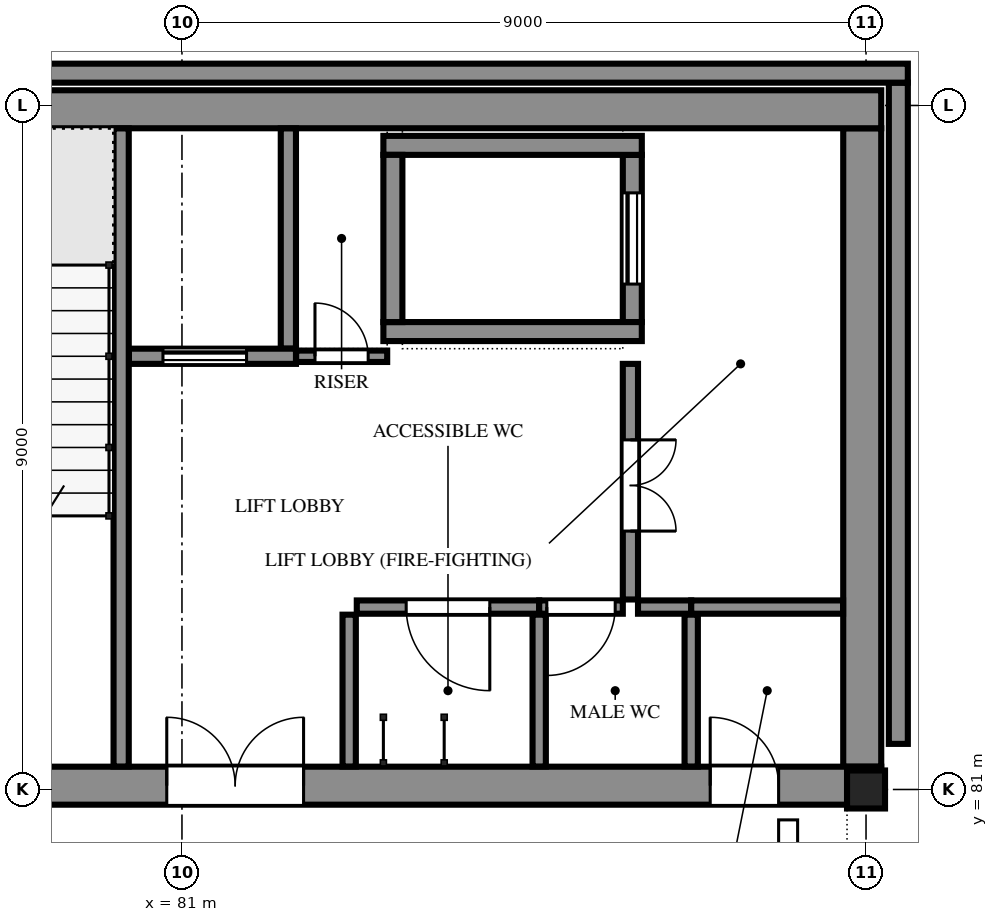
"""IFC4 building model, lengths in metres.
Left out: names, types, materials, properties, quantities, classifications, styles, units other than length and angle.
Written with IfcOpenShell. Run it as: python <this file> out.ifc"""

import sys

from ifc_helpers import new_model, si_unit, direction, frame, frame_2d, origin, origin_2d, place, context, subcontext, project, spatial, polyline, rectangle, hollow_rectangle, outline, extrude, element, fill, save


model = new_model("IFC4")
c1 = context("Model", 3, precision=1e-05, world=origin(), true_north=direction((0.0, 1.0)))
c2 = subcontext(c1, "Body", "Model", "MODEL_VIEW")
j1 = project(units=[si_unit("LENGTHUNIT", "METRE"), si_unit("PLANEANGLEUNIT", "RADIAN")], contexts=[c1])
p1 = place(None, origin())
s1 = spatial("IfcSite", under=j1, at=p1, CompositionType="ELEMENT")
p2 = place(p1, origin())
s2 = spatial("IfcBuilding", under=s1, at=p2, CompositionType="ELEMENT")
p3 = place(p2, frame((0.0, 0.0, 15.9)))
s3 = spatial("IfcBuildingStorey", under=s2, at=p3, CompositionType="ELEMENT", Elevation=15.9)
p4 = place(p3, frame((90.0, 81.0, 0.0), z_axis=(0.0, 0.0, 1.0), x_axis=(1.0, 0.0, 0.0)))
e1 = element("IfcColumn", 1, at=p4, inside=s3, PredefinedType="COLUMN", context=c2, shape_type="SweptSolid", body=[
    extrude(hollow_rectangle(XDim=0.5, YDim=0.5, WallThickness=0.032, at=origin_2d()), origin(), (0.0, 0.0, 1.0), 4.2),
])
p5 = place(p3, frame((71.8, 81.05, 0.0), z_axis=(0.0, 0.0, 1.0), x_axis=(1.0, 0.0, 0.0)))
e2 = element("IfcWall", 2, at=p5, inside=s3, PredefinedType="SOLIDWALL", context=c2, shape_type="SweptSolid", body=[
    extrude(rectangle(XDim=18.4, YDim=0.5, at=frame_2d((9.2, 0.0))), origin(), (0.0, 0.0, 1.0), 4.2),
])
p6 = place(p5, frame((1.5, 0.0, 0.0)))
e3 = element("IfcOpeningElement", 3, at=p6, cuts=e2, PredefinedType="OPENING", context=c2, shape_type="SweptSolid", body=[
    extrude(rectangle(XDim=1.8, YDim=2.1, at=frame_2d((0.9, 1.05))), frame((0.0, 0.26, 0.0), z_axis=(0.0, -1.0, 0.0), x_axis=(1.0, 0.0, 0.0)), (0.0, 0.0, 1.0), 0.52),
])
p7 = place(p5, frame((5.5, 0.0, 0.0)))
e4 = element("IfcOpeningElement", 4, at=p7, cuts=e2, PredefinedType="OPENING", context=c2, shape_type="SweptSolid", body=[
    extrude(rectangle(XDim=1.8, YDim=2.1, at=frame_2d((0.9, 1.05))), frame((0.0, 0.26, 0.0), z_axis=(0.0, -1.0, 0.0), x_axis=(1.0, 0.0, 0.0)), (0.0, 0.0, 1.0), 0.52),
])
p8 = place(p5, frame((9.0, 0.0, 0.0)))
e5 = element("IfcOpeningElement", 5, at=p8, cuts=e2, PredefinedType="OPENING", context=c2, shape_type="SweptSolid", body=[
    extrude(rectangle(XDim=1.8, YDim=2.1, at=frame_2d((0.9, 1.05))), frame((0.0, 0.26, 0.0), z_axis=(0.0, -1.0, 0.0), x_axis=(1.0, 0.0, 0.0)), (0.0, 0.0, 1.0), 0.52),
])
p9 = place(p5, frame((16.15, 0.0, 0.0)))
e6 = element("IfcOpeningElement", 6, at=p9, cuts=e2, PredefinedType="OPENING", context=c2, shape_type="SweptSolid", body=[
    extrude(rectangle(XDim=0.9, YDim=2.1, at=frame_2d((0.45, 1.05))), frame((0.0, 0.26, 0.0), z_axis=(0.0, -1.0, 0.0), x_axis=(1.0, 0.0, 0.0)), (0.0, 0.0, 1.0), 0.52),
])
p10 = place(p3, frame((71.8, 89.95, 0.0), z_axis=(0.0, 0.0, 1.0), x_axis=(1.0, 0.0, 0.0)))
e7 = element("IfcWall", 7, at=p10, inside=s3, PredefinedType="SOLIDWALL", context=c2, shape_type="SweptSolid", body=[
    extrude(rectangle(XDim=18.4, YDim=0.5, at=frame_2d((9.2, 0.0))), origin(), (0.0, 0.0, 1.0), 4.2),
])
p11 = place(p3, frame((89.95, 81.3, 0.0), z_axis=(0.0, 0.0, 1.0), x_axis=(0.0, 1.0, 0.0)))
e8 = element("IfcWall", 8, at=p11, inside=s3, PredefinedType="SOLIDWALL", context=c2, shape_type="SweptSolid", body=[
    extrude(rectangle(XDim=8.4, YDim=0.5, at=frame_2d((4.2, 0.0))), origin(), (0.0, 0.0, 1.0), 4.2),
])
p12 = place(p3, frame((80.2, 81.302, -0.15), z_axis=(0.0, 0.0, 1.0), x_axis=(0.0, 1.0, 0.0)))
e9 = element("IfcWall", 9, at=p12, inside=s3, PredefinedType="SOLIDWALL", context=c2, shape_type="SweptSolid", body=[
    extrude(rectangle(XDim=8.396, YDim=0.2, at=frame_2d((4.198, 0.0))), origin(), (0.0, 0.0, 1.0), 3.666),
])
p13 = place(p3, frame((80.302, 86.7, 0.0), z_axis=(0.0, 0.0, 1.0), x_axis=(1.0, 0.0, 0.0)))
e10 = element("IfcWall", 10, at=p13, inside=s3, PredefinedType="SOLIDWALL", context=c2, shape_type="SweptSolid", body=[
    extrude(rectangle(XDim=2.198, YDim=0.2, at=frame_2d((1.099, 0.0))), origin(), (0.0, 0.0, 1.0), 3.516),
])
p14 = place(p13, frame((0.448, 0.0, 0.0)))
e11 = element("IfcOpeningElement", 11, at=p14, cuts=e10, PredefinedType="OPENING", context=c2, shape_type="SweptSolid", body=[
    extrude(rectangle(XDim=1.1, YDim=2.1, at=frame_2d((0.55, 1.05))), frame((0.0, 0.11, 0.0), z_axis=(0.0, -1.0, 0.0), x_axis=(1.0, 0.0, 0.0)), (0.0, 0.0, 1.0), 0.22),
])
p15 = place(p3, frame((82.4, 86.8, 0.0), z_axis=(0.0, 0.0, 1.0), x_axis=(0.0, 1.0, 0.0)))
e12 = element("IfcWall", 12, at=p15, inside=s3, PredefinedType="SOLIDWALL", context=c2, shape_type="SweptSolid", body=[
    extrude(rectangle(XDim=2.898, YDim=0.2, at=frame_2d((1.449, 0.0))), origin(), (0.0, 0.0, 1.0), 3.516),
])
for number, where, z_axis, x_axis in (
    (13, (83.65, 87.025, 0.0), (0.0, 0.0, 1.0), (1.0, 0.0, 0.0)),
    (14, (83.65, 89.475, 0.0), (0.0, 0.0, 1.0), (1.0, 0.0, 0.0)),
):
    element("IfcWall", number, at=place(p3, frame(where, z_axis=z_axis, x_axis=x_axis)), inside=s3, PredefinedType="SOLIDWALL", context=c2, shape_type="SweptSolid", body=[
        extrude(rectangle(XDim=3.4, YDim=0.25, at=frame_2d((1.7, 0.0))), origin(), (0.0, 0.0, 1.0), 3.516),
    ])
p16 = place(p3, frame((83.775, 87.15, 0.0), z_axis=(0.0, 0.0, 1.0), x_axis=(0.0, 1.0, 0.0)))
e15 = element("IfcWall", 15, at=p16, inside=s3, PredefinedType="SOLIDWALL", context=c2, shape_type="SweptSolid", body=[
    extrude(rectangle(XDim=2.2, YDim=0.25, at=frame_2d((1.1, 0.0))), origin(), (0.0, 0.0, 1.0), 3.516),
])
p17 = place(p3, frame((86.925, 87.15, 0.0), z_axis=(0.0, 0.0, 1.0), x_axis=(0.0, 1.0, 0.0)))
e16 = element("IfcWall", 16, at=p17, inside=s3, PredefinedType="SOLIDWALL", context=c2, shape_type="SweptSolid", body=[
    extrude(rectangle(XDim=2.2, YDim=0.25, at=frame_2d((1.1, 0.0))), origin(), (0.0, 0.0, 1.0), 3.516),
])
p18 = place(p17, frame((0.5, 0.0, 0.0)))
e17 = element("IfcOpeningElement", 17, at=p18, cuts=e16, PredefinedType="OPENING", context=c2, shape_type="SweptSolid", body=[
    extrude(rectangle(XDim=1.2, YDim=2.1, at=frame_2d((0.6, 1.05))), frame((0.0, 0.135, 0.0), z_axis=(0.0, -1.0, 0.0), x_axis=(1.0, 0.0, 0.0)), (0.0, 0.0, 1.0), 0.27),
])
p19 = place(p3, frame((85.7, 83.4, 0.0), z_axis=(0.0, 0.0, 1.0), x_axis=(-1.0, 0.0, 0.0)))
e18 = element("IfcWall", 18, at=p19, inside=s3, PredefinedType="PARTITIONING", context=c2, shape_type="SweptSolid", body=[
    extrude(rectangle(XDim=2.4, YDim=0.175, at=frame_2d((1.2, 0.0))), origin(), (0.0, 0.0, 1.0), 3.307),
])
p20 = place(p19, frame((0.65, 0.0, 0.0)))
e19 = element("IfcOpeningElement", 19, at=p20, cuts=e18, PredefinedType="OPENING", context=c2, shape_type="SweptSolid", body=[
    extrude(rectangle(XDim=1.1, YDim=2.1, at=frame_2d((0.55, 1.05))), frame((0.0, 0.097, 0.0), z_axis=(0.0, -1.0, 0.0), x_axis=(1.0, 0.0, 0.0)), (0.0, 0.0, 1.0), 0.195),
])
p21 = place(p3, frame((83.2, 83.3, 0.0), z_axis=(0.0, 0.0, 1.0), x_axis=(0.0, -1.0, 0.0)))
e20 = element("IfcWall", 20, at=p21, inside=s3, PredefinedType="PARTITIONING", context=c2, shape_type="SweptSolid", body=[
    extrude(rectangle(XDim=1.998, YDim=0.175, at=frame_2d((0.999, 0.0))), origin(), (0.0, 0.0, 1.0), 3.307),
])
p22 = place(p3, frame((86.8, 83.4, 0.0), z_axis=(0.0, 0.0, 1.0), x_axis=(-1.0, 0.0, 0.0)))
e21 = element("IfcWall", 21, at=p22, inside=s3, PredefinedType="PARTITIONING", context=c2, shape_type="SweptSolid", body=[
    extrude(rectangle(XDim=1.1, YDim=0.175, at=frame_2d((0.55, 0.0))), origin(), (0.0, 0.0, 1.0), 3.307),
])
p23 = place(p22, frame((0.1, 0.0, 0.0)))
e22 = element("IfcOpeningElement", 22, at=p23, cuts=e21, PredefinedType="OPENING", context=c2, shape_type="SweptSolid", body=[
    extrude(rectangle(XDim=0.9, YDim=2.1, at=frame_2d((0.45, 1.05))), frame((0.0, 0.097, 0.0), z_axis=(0.0, -1.0, 0.0), x_axis=(1.0, 0.0, 0.0)), (0.0, 0.0, 1.0), 0.195),
])
p24 = place(p3, frame((86.9, 86.6, 0.0), z_axis=(0.0, 0.0, 1.0), x_axis=(0.0, -1.0, 0.0)))
e23 = element("IfcWall", 23, at=p24, inside=s3, PredefinedType="PARTITIONING", context=c2, shape_type="SweptSolid", body=[
    extrude(rectangle(XDim=3.1, YDim=0.2, at=frame_2d((1.55, 0.0))), origin(), (0.0, 0.0, 1.0), 3.382),
])
p25 = place(p24, frame((1.0, 0.0, 0.0)))
e24 = element("IfcOpeningElement", 24, at=p25, cuts=e23, PredefinedType="OPENING", context=c2, shape_type="SweptSolid", body=[
    extrude(rectangle(XDim=1.2, YDim=2.1, at=frame_2d((0.6, 1.05))), frame((0.0, 0.11, 0.0), z_axis=(0.0, -1.0, 0.0), x_axis=(1.0, 0.0, 0.0)), (0.0, 0.0, 1.0), 0.22),
])
p26 = place(p3, frame((82.502, 86.7, 0.0), z_axis=(0.0, 0.0, 1.0), x_axis=(1.0, 0.0, 0.0)))
e25 = element("IfcWall", 25, at=p26, inside=s3, PredefinedType="SOLIDWALL", context=c2, shape_type="SweptSolid", body=[
    extrude(rectangle(XDim=1.198, YDim=0.15, at=frame_2d((0.599, 0.0))), origin(), (0.0, 0.0, 1.0), 3.516),
])
p27 = place(p26, frame((0.248, 0.0, 0.0)))
e26 = element("IfcOpeningElement", 26, at=p27, cuts=e25, PredefinedType="OPENING", context=c2, shape_type="SweptSolid", body=[
    extrude(rectangle(XDim=0.7, YDim=2.0, at=frame_2d((0.35, 1.0))), frame((0.0, 0.085, 0.0), z_axis=(0.0, -1.0, 0.0), x_axis=(1.0, 0.0, 0.0)), (0.0, 0.0, 1.0), 0.17),
])
p28 = place(p3, frame((87.7, 83.4, 0.0), z_axis=(0.0, 0.0, 1.0), x_axis=(-1.0, 0.0, 0.0)))
e27 = element("IfcWall", 27, at=p28, inside=s3, PredefinedType="PARTITIONING", context=c2, shape_type="SweptSolid", body=[
    extrude(rectangle(XDim=0.7, YDim=0.175, at=frame_2d((0.35, 0.0))), origin(), (0.0, 0.0, 1.0), 3.307),
])
for number, where, z_axis, x_axis in (
    (28, (89.698, 83.4, 0.0), (0.0, 0.0, 1.0), (-1.0, 0.0, 0.0)),
    (29, (85.7, 83.3, 0.0), (0.0, 0.0, 1.0), (0.0, -1.0, 0.0)),
    (30, (87.7, 83.3, 0.0), (0.0, 0.0, 1.0), (0.0, -1.0, 0.0)),
):
    element("IfcWall", number, at=place(p3, frame(where, z_axis=z_axis, x_axis=x_axis)), inside=s3, PredefinedType="PARTITIONING", context=c2, shape_type="SweptSolid", body=[
        extrude(rectangle(XDim=1.998, YDim=0.175, at=frame_2d((0.999, 0.0))), origin(), (0.0, 0.0, 1.0), 3.307),
    ])
p29 = place(p14, origin())
e31 = element("IfcDoor", 31, at=p29, inside=s3, OperationType="SLIDING_TO_LEFT", PredefinedType="DOOR", context=c2, shape_type="SweptSolid", body=[
    extrude(outline(polyline([(0.0, 0.0), (0.07, 0.0), (0.07, 2.03), (1.03, 2.03), (1.03, 0.0), (1.1, 0.0), (1.1, 2.1), (0.0, 2.1), (0.0, 0.0)])), frame((0.0, 0.025, 0.0), z_axis=(0.0, -1.0, 0.0), x_axis=(1.0, 0.0, 0.0)), (0.0, 0.0, 1.0), 0.05),
    extrude(rectangle(XDim=0.524, YDim=2.016, at=frame_2d((0.336, 1.018))), frame((0.0, 0.018, 0.0), z_axis=(0.0, -1.0, 0.0), x_axis=(1.0, 0.0, 0.0)), (0.0, 0.0, 1.0), 0.016),
    extrude(rectangle(XDim=0.52, YDim=2.016, at=frame_2d((0.766, 1.018))), frame((0.0, -0.002, 0.0), z_axis=(0.0, -1.0, 0.0), x_axis=(1.0, 0.0, 0.0)), (0.0, 0.0, 1.0), 0.016),
])
fill(e11, e31)
p30 = place(p18, origin())
e32 = element("IfcDoor", 32, at=p30, inside=s3, OperationType="SLIDING_TO_LEFT", PredefinedType="DOOR", context=c2, shape_type="SweptSolid", body=[
    extrude(outline(polyline([(0.0, 0.0), (0.07, 0.0), (0.07, 2.03), (1.13, 2.03), (1.13, 0.0), (1.2, 0.0), (1.2, 2.1), (0.0, 2.1), (0.0, 0.0)])), frame((0.0, 0.025, 0.0), z_axis=(0.0, -1.0, 0.0), x_axis=(1.0, 0.0, 0.0)), (0.0, 0.0, 1.0), 0.05),
    extrude(rectangle(XDim=0.579, YDim=2.016, at=frame_2d((0.363, 1.018))), frame((0.0, 0.018, 0.0), z_axis=(0.0, -1.0, 0.0), x_axis=(1.0, 0.0, 0.0)), (0.0, 0.0, 1.0), 0.016),
    extrude(rectangle(XDim=0.575, YDim=2.016, at=frame_2d((0.839, 1.018))), frame((0.0, -0.002, 0.0), z_axis=(0.0, -1.0, 0.0), x_axis=(1.0, 0.0, 0.0)), (0.0, 0.0, 1.0), 0.016),
])
fill(e17, e32)
p31 = place(p8, origin())
e33 = element("IfcDoor", 33, at=p31, inside=s3, OperationType="DOUBLE_DOOR_SINGLE_SWING", PredefinedType="DOOR", context=c2, shape_type="SweptSolid", body=[
    extrude(outline(polyline([(0.0, 0.0), (0.07, 0.0), (0.07, 2.03), (1.73, 2.03), (1.73, 0.0), (1.8, 0.0), (1.8, 2.1), (0.0, 2.1), (0.0, 0.0)])), frame((0.0, 0.025, 0.0), z_axis=(0.0, -1.0, 0.0), x_axis=(1.0, 0.0, 0.0)), (0.0, 0.0, 1.0), 0.05),
    extrude(outline(polyline([(0.074, 0.01), (0.897, 0.01), (0.897, 2.026), (0.074, 2.026), (0.074, 0.01)]), holes=[polyline([(0.194, 0.16), (0.777, 0.16), (0.777, 1.01), (0.194, 1.01), (0.194, 0.16)]), polyline([(0.335, 1.16), (0.635, 1.16), (0.635, 1.76), (0.335, 1.76), (0.335, 1.16)])]), frame((0.0, 0.017, 0.0), z_axis=(0.0, -1.0, 0.0), x_axis=(1.0, 0.0, 0.0)), (0.0, 0.0, 1.0), 0.035),
    extrude(rectangle(XDim=0.583, YDim=0.85, at=frame_2d((0.485, 0.585))), frame((0.0, 0.009, 0.0), z_axis=(0.0, -1.0, 0.0), x_axis=(1.0, 0.0, 0.0)), (0.0, 0.0, 1.0), 0.017),
    extrude(rectangle(XDim=0.3, YDim=0.6, at=frame_2d((0.485, 1.46))), frame((0.0, 0.006, 0.0), z_axis=(0.0, -1.0, 0.0), x_axis=(1.0, 0.0, 0.0)), (0.0, 0.0, 1.0), 0.012),
    extrude(outline(polyline([(0.903, 0.01), (1.726, 0.01), (1.726, 2.026), (0.903, 2.026), (0.903, 0.01)]), holes=[polyline([(1.023, 0.16), (1.606, 0.16), (1.606, 1.01), (1.023, 1.01), (1.023, 0.16)]), polyline([(1.165, 1.16), (1.465, 1.16), (1.465, 1.76), (1.165, 1.76), (1.165, 1.16)])]), frame((0.0, 0.017, 0.0), z_axis=(0.0, -1.0, 0.0), x_axis=(1.0, 0.0, 0.0)), (0.0, 0.0, 1.0), 0.035),
    extrude(rectangle(XDim=0.583, YDim=0.85, at=frame_2d((1.314, 0.585))), frame((0.0, 0.009, 0.0), z_axis=(0.0, -1.0, 0.0), x_axis=(1.0, 0.0, 0.0)), (0.0, 0.0, 1.0), 0.017),
    extrude(rectangle(XDim=0.3, YDim=0.6, at=frame_2d((1.314, 1.46))), frame((0.0, 0.006, 0.0), z_axis=(0.0, -1.0, 0.0), x_axis=(1.0, 0.0, 0.0)), (0.0, 0.0, 1.0), 0.012),
])
fill(e5, e33)
p32 = place(p25, origin())
e34 = element("IfcDoor", 34, at=p32, inside=s3, OperationType="DOUBLE_DOOR_SINGLE_SWING", PredefinedType="DOOR", context=c2, shape_type="SweptSolid", body=[
    extrude(outline(polyline([(0.0, 0.0), (0.07, 0.0), (0.07, 2.03), (1.13, 2.03), (1.13, 0.0), (1.2, 0.0), (1.2, 2.1), (0.0, 2.1), (0.0, 0.0)])), frame((0.0, 0.025, 0.0), z_axis=(0.0, -1.0, 0.0), x_axis=(1.0, 0.0, 0.0)), (0.0, 0.0, 1.0), 0.05),
    extrude(outline(polyline([(0.074, 0.01), (0.597, 0.01), (0.597, 2.026), (0.074, 2.026), (0.074, 0.01)]), holes=[polyline([(0.178, 0.373), (0.492, 0.373), (0.492, 1.784), (0.178, 1.784), (0.178, 0.373)])]), frame((0.0, 0.017, 0.0), z_axis=(0.0, -1.0, 0.0), x_axis=(1.0, 0.0, 0.0)), (0.0, 0.0, 1.0), 0.035),
    extrude(rectangle(XDim=0.314, YDim=1.411, at=frame_2d((0.335, 1.079))), frame((0.0, 0.009, 0.0), z_axis=(0.0, -1.0, 0.0), x_axis=(1.0, 0.0, 0.0)), (0.0, 0.0, 1.0), 0.017),
    extrude(outline(polyline([(0.603, 0.01), (1.126, 0.01), (1.126, 2.026), (0.603, 2.026), (0.603, 0.01)]), holes=[polyline([(0.708, 0.373), (1.021, 0.373), (1.021, 1.784), (0.708, 1.784), (0.708, 0.373)])]), frame((0.0, 0.017, 0.0), z_axis=(0.0, -1.0, 0.0), x_axis=(1.0, 0.0, 0.0)), (0.0, 0.0, 1.0), 0.035),
    extrude(rectangle(XDim=0.314, YDim=1.411, at=frame_2d((0.865, 1.079))), frame((0.0, 0.009, 0.0), z_axis=(0.0, -1.0, 0.0), x_axis=(1.0, 0.0, 0.0)), (0.0, 0.0, 1.0), 0.017),
])
fill(e24, e34)
p33 = place(p27, origin())
e35 = element("IfcDoor", 35, at=p33, inside=s3, OperationType="SINGLE_SWING_LEFT", PredefinedType="DOOR", context=c2, shape_type="SweptSolid", body=[
    extrude(outline(polyline([(0.0, 0.0), (0.07, 0.0), (0.07, 1.93), (0.63, 1.93), (0.63, 0.0), (0.7, 0.0), (0.7, 2.0), (0.0, 2.0), (0.0, 0.0)])), frame((0.0, 0.025, 0.0), z_axis=(0.0, -1.0, 0.0), x_axis=(1.0, 0.0, 0.0)), (0.0, 0.0, 1.0), 0.05),
    extrude(outline(polyline([(0.074, 0.01), (0.626, 0.01), (0.626, 1.926), (0.074, 1.926), (0.074, 0.01)]), holes=[polyline([(0.184, 0.16), (0.516, 0.16), (0.516, 1.01), (0.184, 1.01), (0.184, 0.16)]), polyline([(0.2, 1.16), (0.5, 1.16), (0.5, 1.76), (0.2, 1.76), (0.2, 1.16)])]), frame((0.0, 0.017, 0.0), z_axis=(0.0, -1.0, 0.0), x_axis=(1.0, 0.0, 0.0)), (0.0, 0.0, 1.0), 0.035),
    extrude(rectangle(XDim=0.331, YDim=0.85, at=frame_2d((0.35, 0.585))), frame((0.0, 0.009, 0.0), z_axis=(0.0, -1.0, 0.0), x_axis=(1.0, 0.0, 0.0)), (0.0, 0.0, 1.0), 0.017),
    extrude(rectangle(XDim=0.3, YDim=0.6, at=frame_2d((0.35, 1.46))), frame((0.0, 0.006, 0.0), z_axis=(0.0, -1.0, 0.0), x_axis=(1.0, 0.0, 0.0)), (0.0, 0.0, 1.0), 0.012),
])
fill(e26, e35)
p34 = place(p20, origin())
e36 = element("IfcDoor", 36, at=p34, inside=s3, OperationType="SINGLE_SWING_LEFT", PredefinedType="DOOR", context=c2, shape_type="SweptSolid", body=[
    extrude(outline(polyline([(0.0, 0.0), (0.07, 0.0), (0.07, 2.03), (1.03, 2.03), (1.03, 0.0), (1.1, 0.0), (1.1, 2.1), (0.0, 2.1), (0.0, 0.0)])), frame((0.0, 0.025, 0.0), z_axis=(0.0, -1.0, 0.0), x_axis=(1.0, 0.0, 0.0)), (0.0, 0.0, 1.0), 0.05),
    extrude(outline(polyline([(0.074, 0.01), (1.026, 0.01), (1.026, 2.026), (0.074, 2.026), (0.074, 0.01)]), holes=[polyline([(0.194, 0.16), (0.906, 0.16), (0.906, 1.01), (0.194, 1.01), (0.194, 0.16)]), polyline([(0.4, 1.16), (0.7, 1.16), (0.7, 1.76), (0.4, 1.76), (0.4, 1.16)])]), frame((0.0, 0.017, 0.0), z_axis=(0.0, -1.0, 0.0), x_axis=(1.0, 0.0, 0.0)), (0.0, 0.0, 1.0), 0.035),
    extrude(rectangle(XDim=0.712, YDim=0.85, at=frame_2d((0.55, 0.585))), frame((0.0, 0.009, 0.0), z_axis=(0.0, -1.0, 0.0), x_axis=(1.0, 0.0, 0.0)), (0.0, 0.0, 1.0), 0.017),
    extrude(rectangle(XDim=0.3, YDim=0.6, at=frame_2d((0.55, 1.46))), frame((0.0, 0.006, 0.0), z_axis=(0.0, -1.0, 0.0), x_axis=(1.0, 0.0, 0.0)), (0.0, 0.0, 1.0), 0.012),
])
fill(e19, e36)
p35 = place(p23, origin())
e37 = element("IfcDoor", 37, at=p35, inside=s3, OperationType="SINGLE_SWING_RIGHT", PredefinedType="DOOR", context=c2, shape_type="SweptSolid", body=[
    extrude(outline(polyline([(0.0, 0.0), (0.07, 0.0), (0.07, 2.03), (0.83, 2.03), (0.83, 0.0), (0.9, 0.0), (0.9, 2.1), (0.0, 2.1), (0.0, 0.0)])), frame((0.0, 0.025, 0.0), z_axis=(0.0, -1.0, 0.0), x_axis=(1.0, 0.0, 0.0)), (0.0, 0.0, 1.0), 0.05),
    extrude(outline(polyline([(0.074, 0.01), (0.826, 0.01), (0.826, 2.026), (0.074, 2.026), (0.074, 0.01)]), holes=[polyline([(0.194, 0.16), (0.706, 0.16), (0.706, 1.01), (0.194, 1.01), (0.194, 0.16)]), polyline([(0.3, 1.16), (0.6, 1.16), (0.6, 1.76), (0.3, 1.76), (0.3, 1.16)])]), frame((0.0, 0.017, 0.0), z_axis=(0.0, -1.0, 0.0), x_axis=(1.0, 0.0, 0.0)), (0.0, 0.0, 1.0), 0.035),
    extrude(rectangle(XDim=0.512, YDim=0.85, at=frame_2d((0.45, 0.585))), frame((0.0, 0.009, 0.0), z_axis=(0.0, -1.0, 0.0), x_axis=(1.0, 0.0, 0.0)), (0.0, 0.0, 1.0), 0.017),
    extrude(rectangle(XDim=0.3, YDim=0.6, at=frame_2d((0.45, 1.46))), frame((0.0, 0.006, 0.0), z_axis=(0.0, -1.0, 0.0), x_axis=(1.0, 0.0, 0.0)), (0.0, 0.0, 1.0), 0.012),
])
fill(e22, e37)
p36 = place(p9, origin())
e38 = element("IfcDoor", 38, at=p36, inside=s3, OperationType="SINGLE_SWING_LEFT", PredefinedType="DOOR", context=c2, shape_type="SweptSolid", body=[
    extrude(outline(polyline([(0.0, 0.0), (0.07, 0.0), (0.07, 2.03), (0.83, 2.03), (0.83, 0.0), (0.9, 0.0), (0.9, 2.1), (0.0, 2.1), (0.0, 0.0)])), frame((0.0, 0.025, 0.0), z_axis=(0.0, -1.0, 0.0), x_axis=(1.0, 0.0, 0.0)), (0.0, 0.0, 1.0), 0.05),
    extrude(outline(polyline([(0.074, 0.01), (0.826, 0.01), (0.826, 2.026), (0.074, 2.026), (0.074, 0.01)]), holes=[polyline([(0.194, 0.16), (0.706, 0.16), (0.706, 1.01), (0.194, 1.01), (0.194, 0.16)]), polyline([(0.3, 1.16), (0.6, 1.16), (0.6, 1.76), (0.3, 1.76), (0.3, 1.16)])]), frame((0.0, 0.017, 0.0), z_axis=(0.0, -1.0, 0.0), x_axis=(1.0, 0.0, 0.0)), (0.0, 0.0, 1.0), 0.035),
    extrude(rectangle(XDim=0.512, YDim=0.85, at=frame_2d((0.45, 0.585))), frame((0.0, 0.009, 0.0), z_axis=(0.0, -1.0, 0.0), x_axis=(1.0, 0.0, 0.0)), (0.0, 0.0, 1.0), 0.017),
    extrude(rectangle(XDim=0.3, YDim=0.6, at=frame_2d((0.45, 1.46))), frame((0.0, 0.006, 0.0), z_axis=(0.0, -1.0, 0.0), x_axis=(1.0, 0.0, 0.0)), (0.0, 0.0, 1.0), 0.012),
])
fill(e6, e38)
save(model, sys.argv[1])
